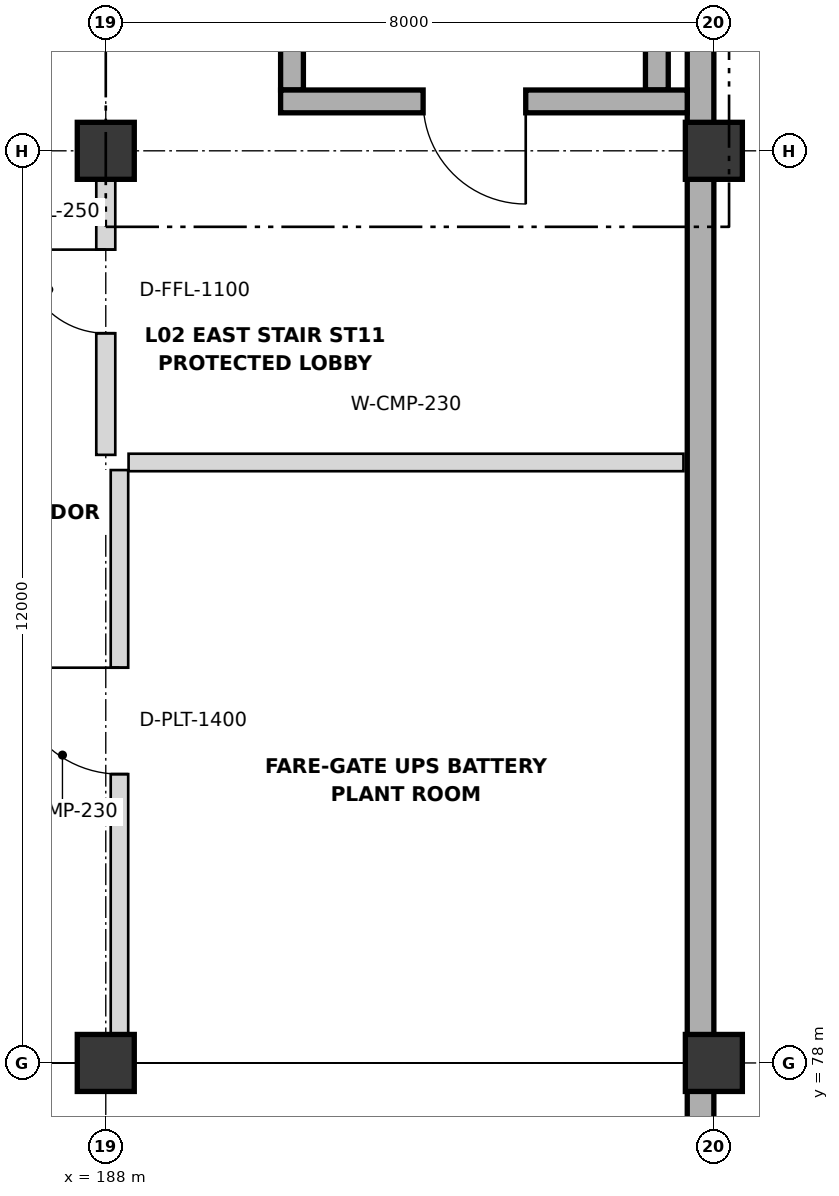
"""IFC4 building model, lengths in metres.
Left out: names, types, materials, properties, quantities, classifications, styles, units other than length and angle.
Written with IfcOpenShell. Run it as: python <this file> out.ifc"""

import sys

from ifc_helpers import new_model, si_unit, direction, frame, frame_2d, origin, origin_2d, place, context, subcontext, project, spatial, rectangle, extrude, element, fill, save


model = new_model("IFC4")
c1 = context("Model", 3, precision=1e-05, world=origin(), true_north=direction((0.0, 1.0)))
c2 = subcontext(c1, "Body", "Model", "MODEL_VIEW")
j1 = project(units=[si_unit("LENGTHUNIT", "METRE"), si_unit("PLANEANGLEUNIT", "RADIAN")], contexts=[c1])
p1 = place(None, origin())
s1 = spatial("IfcSite", under=j1, at=p1, CompositionType="ELEMENT")
p2 = place(p1, origin())
s2 = spatial("IfcBuilding", under=s1, at=p2, CompositionType="ELEMENT")
p3 = place(p2, frame((0.0, 0.0, 9.6)))
s3 = spatial("IfcBuildingStorey", under=s2, at=p3, CompositionType="ELEMENT", Elevation=9.6)
for number, where, z_axis, x_axis in (
    (1, (188.0, 78.0, 0.0), (0.0, 0.0, 1.0), (1.0, 0.0, 0.0)),
    (2, (188.0, 90.0, 0.0), (0.0, 0.0, 1.0), (1.0, 0.0, 0.0)),
    (3, (196.0, 78.0, 0.0), (0.0, 0.0, 1.0), (1.0, 0.0, 0.0)),
    (4, (196.0, 90.0, 0.0), (0.0, 0.0, 1.0), (1.0, 0.0, 0.0)),
):
    element("IfcColumn", number, at=place(p3, frame(where, z_axis=z_axis, x_axis=x_axis)), inside=s3, PredefinedType="COLUMN", context=c2, shape_type="SweptSolid", body=[
        extrude(rectangle(XDim=0.75, YDim=0.75, at=origin_2d()), origin(), (0.0, 0.0, 1.0), 4.8),
    ])
for number, where, z_axis, x_axis in (
    (5, (195.825, 77.63, 0.0), (0.0, 0.0, 1.0), (0.0, -1.0, 0.0)),
    (6, (195.825, 89.63, 0.0), (0.0, 0.0, 1.0), (0.0, -1.0, 0.0)),
    (7, (195.825, 101.63, 0.0), (0.0, 0.0, 1.0), (0.0, -1.0, 0.0)),
):
    element("IfcWall", number, at=place(p3, frame(where, z_axis=z_axis, x_axis=x_axis)), inside=s3, PredefinedType="SOLIDWALL", context=c2, shape_type="SweptSolid", body=[
        extrude(rectangle(XDim=11.26, YDim=0.35, at=frame_2d((5.63, 0.0))), origin(), (0.0, 0.0, 1.0), 4.8),
    ])
for number, where, z_axis, x_axis in (
    (8, (190.45, 90.8, 0.0), (0.0, 0.0, 1.0), (0.0, 1.0, 0.0)),
    (9, (195.25, 99.4, 0.0), (0.0, 0.0, 1.0), (0.0, -1.0, 0.0)),
):
    element("IfcWall", number, at=place(p3, frame(where, z_axis=z_axis, x_axis=x_axis)), inside=s3, PredefinedType="SHEAR", context=c2, shape_type="SweptSolid", body=[
        extrude(rectangle(XDim=8.6, YDim=0.3, at=frame_2d((4.3, 0.0))), origin(), (0.0, 0.0, 1.0), 4.8),
    ])
p4 = place(p3, frame((195.65, 90.65, 0.0), z_axis=(0.0, 0.0, 1.0), x_axis=(-1.0, 0.0, 0.0)))
e10 = element("IfcWall", 10, at=p4, inside=s3, PredefinedType="SHEAR", context=c2, shape_type="SweptSolid", body=[
    extrude(rectangle(XDim=5.35, YDim=0.3, at=frame_2d((2.675, 0.0))), origin(), (0.0, 0.0, 1.0), 4.8),
])
p5 = place(p4, frame((2.125, 0.0, 0.0)))
e11 = element("IfcOpeningElement", 11, at=p5, cuts=e10, PredefinedType="OPENING", context=c2, shape_type="SweptSolid", body=[
    extrude(rectangle(XDim=1.35, YDim=2.15, at=frame_2d((0.675, 1.075))), frame((0.0, 0.16, 0.0), z_axis=(0.0, -1.0, 0.0), x_axis=(1.0, 0.0, 0.0)), (0.0, 0.0, 1.0), 0.32),
])
p6 = place(p3, frame((188.0, 86.0, 0.0), z_axis=(0.0, 0.0, 1.0), x_axis=(0.0, 1.0, 0.0)))
e12 = element("IfcWall", 12, at=p6, inside=s3, PredefinedType="PARTITIONING", context=c2, shape_type="SweptSolid", body=[
    extrude(rectangle(XDim=4.35, YDim=0.25, at=frame_2d((2.175, 0.0))), origin(), (0.0, 0.0, 1.0), 3.658),
])
p7 = place(p6, frame((1.6, 0.0, 0.0)))
e13 = element("IfcOpeningElement", 13, at=p7, cuts=e12, PredefinedType="OPENING", context=c2, shape_type="SweptSolid", body=[
    extrude(rectangle(XDim=1.1, YDim=2.15, at=frame_2d((0.55, 1.075))), frame((0.0, 0.135, 0.0), z_axis=(0.0, -1.0, 0.0), x_axis=(1.0, 0.0, 0.0)), (0.0, 0.0, 1.0), 0.27),
])
p8 = place(p3, frame((188.18, 78.3, 0.0), z_axis=(0.0, 0.0, 1.0), x_axis=(0.0, 1.0, 0.0)))
e14 = element("IfcWall", 14, at=p8, inside=s3, PredefinedType="PARTITIONING", context=c2, shape_type="SweptSolid", body=[
    extrude(rectangle(XDim=7.5, YDim=0.23, at=frame_2d((3.75, 0.0))), origin(), (0.0, 0.0, 1.0), 3.658),
])
p9 = place(p8, frame((3.5, 0.0, 0.0)))
e15 = element("IfcOpeningElement", 15, at=p9, cuts=e14, PredefinedType="OPENING", context=c2, shape_type="SweptSolid", body=[
    extrude(rectangle(XDim=1.4, YDim=2.2, at=frame_2d((0.7, 1.1))), frame((0.0, 0.125, 0.0), z_axis=(0.0, -1.0, 0.0), x_axis=(1.0, 0.0, 0.0)), (0.0, 0.0, 1.0), 0.25),
])
p10 = place(p3, frame((188.3, 85.9, 0.0), z_axis=(0.0, 0.0, 1.0), x_axis=(1.0, 0.0, 0.0)))
e16 = element("IfcWall", 16, at=p10, inside=s3, PredefinedType="PARTITIONING", context=c2, shape_type="SweptSolid", body=[
    extrude(rectangle(XDim=7.3, YDim=0.23, at=frame_2d((3.65, 0.0))), origin(), (0.0, 0.0, 1.0), 3.758),
])
p11 = place(p5, origin())
e17 = element("IfcDoor", 17, at=p11, inside=s3, OperationType="SINGLE_SWING_LEFT", PredefinedType="DOOR", context=c2, shape_type="SweptSolid", body=[
    extrude(rectangle(XDim=1.35, YDim=2.15, at=frame_2d((0.675, 1.075))), frame((0.0, 0.025, 0.0), z_axis=(0.0, -1.0, 0.0), x_axis=(1.0, 0.0, 0.0)), (0.0, 0.0, 1.0), 0.05),
])
fill(e11, e17)
p12 = place(p7, origin())
e18 = element("IfcDoor", 18, at=p12, inside=s3, OperationType="SINGLE_SWING_RIGHT", PredefinedType="DOOR", context=c2, shape_type="SweptSolid", body=[
    extrude(rectangle(XDim=1.1, YDim=2.15, at=frame_2d((0.55, 1.075))), frame((0.0, 0.025, 0.0), z_axis=(0.0, -1.0, 0.0), x_axis=(1.0, 0.0, 0.0)), (0.0, 0.0, 1.0), 0.05),
])
fill(e13, e18)
p13 = place(p9, origin())
e19 = element("IfcDoor", 19, at=p13, inside=s3, OperationType="SINGLE_SWING_RIGHT", PredefinedType="DOOR", context=c2, shape_type="SweptSolid", body=[
    extrude(rectangle(XDim=1.4, YDim=2.2, at=frame_2d((0.7, 1.1))), frame((0.0, 0.025, 0.0), z_axis=(0.0, -1.0, 0.0), x_axis=(1.0, 0.0, 0.0)), (0.0, 0.0, 1.0), 0.05),
])
fill(e15, e19)
save(model, sys.argv[1])
